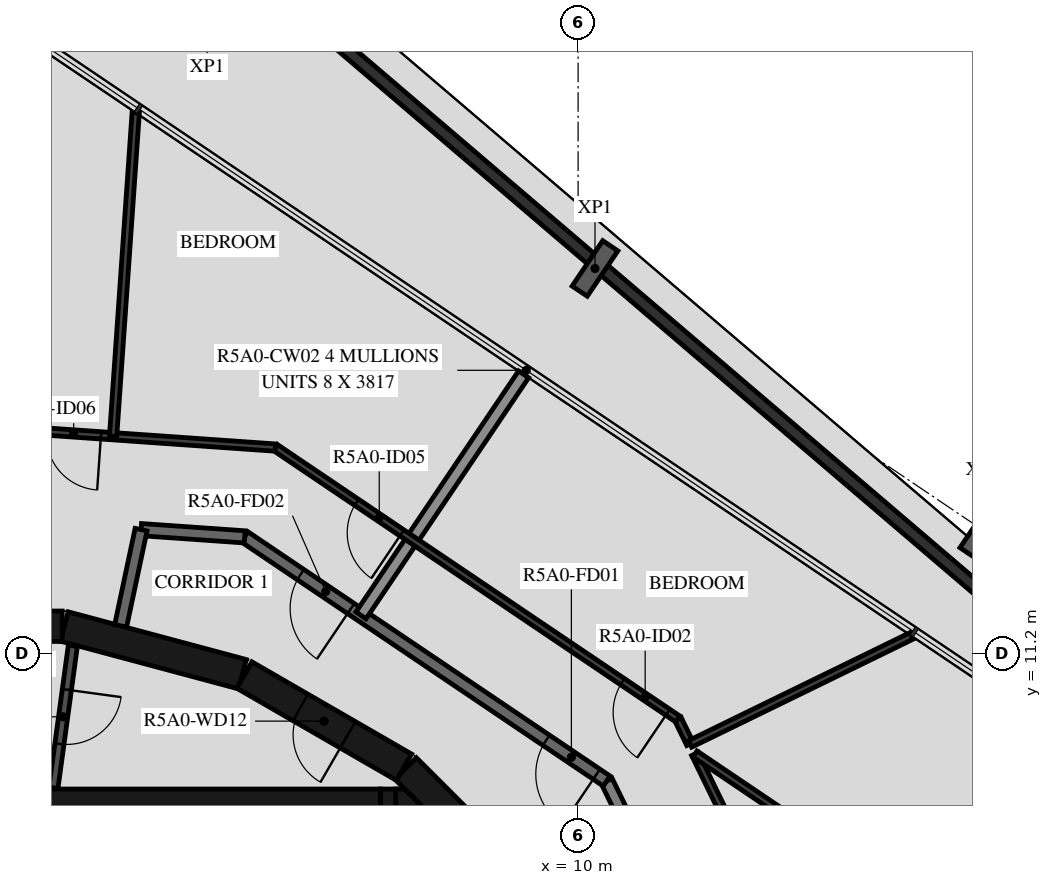
"""IFC4 building model, lengths in metres.
Left out: names, types, materials, properties, quantities, classifications, styles, units other than length and angle.
Written with IfcOpenShell. Run it as: python <this file> out.ifc"""

import sys

from ifc_helpers import new_model, si_unit, direction, frame, frame_2d, origin, origin_2d, place, context, subcontext, project, spatial, polyline, rectangle, i_section, outline, extrude, element, fill, save


model = new_model("IFC4")
c1 = context("Model", 3, precision=1e-05, world=origin(), true_north=direction((0.0, 1.0)))
c2 = subcontext(c1, "Body", "Model", "MODEL_VIEW")
j1 = project(units=[si_unit("LENGTHUNIT", "METRE"), si_unit("PLANEANGLEUNIT", "RADIAN")], contexts=[c1])
p1 = place(None, origin())
s1 = spatial("IfcSite", under=j1, at=p1, CompositionType="ELEMENT")
p2 = place(p1, origin())
s2 = spatial("IfcBuilding", under=s1, at=p2, CompositionType="ELEMENT")
p3 = place(p2, frame((0.0, 0.0, 188.4)))
s3 = spatial("IfcBuildingStorey", under=s2, at=p3, CompositionType="ELEMENT", Elevation=188.4)
for number, where, z_axis, x_axis in (
    (1, (16.656, 13.228, -0.45), (0.0, 0.0, 1.0), (0.829, -0.559, 0.0)),
    (2, (10.278, 17.531, -0.45), (0.0, 0.0, 1.0), (0.829, -0.559, 0.0)),
):
    element("IfcColumn", number, at=place(p3, frame(where, z_axis=z_axis, x_axis=x_axis)), inside=s3, PredefinedType="COLUMN", context=c2, shape_type="SweptSolid", body=[
        extrude(i_section(OverallWidth=0.3, OverallDepth=0.9, WebThickness=0.019, FlangeThickness=0.035, FilletRadius=0.03, at=origin_2d()), origin(), (0.0, 0.0, 1.0), 3.57),
    ])
p4 = place(p3, frame((-0.808, 27.101, 0.03), z_axis=(0.0, 0.0, 1.0), x_axis=(0.76040780846, -0.649445890613, 0.0)))
e3 = element("IfcWall", 3, at=p4, inside=s3, PredefinedType="PARAPET", context=c2, shape_type="SweptSolid", body=[
    extrude(rectangle(XDim=36.429, YDim=0.2, at=frame_2d((18.214, 0.0))), origin(), (0.0, 0.0, 1.0), 1.5),
])
p5 = place(p3, frame((9.308, 7.164, 0.0), z_axis=(0.0, 0.0, 1.0), x_axis=(-0.707106781187, 0.707106781187, 0.0)))
e4 = element("IfcWall", 4, at=p5, inside=s3, PredefinedType="SHEAR", context=c2, shape_type="SweptSolid", body=[
    extrude(rectangle(XDim=3.032, YDim=0.5, at=frame_2d((1.516, 0.0))), origin(), (0.0, 0.0, 1.0), 3.12),
])
p6 = place(p5, frame((0.416, 0.0, 0.0)))
e5 = element("IfcOpeningElement", 5, at=p6, cuts=e4, PredefinedType="OPENING", context=c2, shape_type="SweptSolid", body=[
    extrude(rectangle(XDim=1.2, YDim=2.1, at=frame_2d((0.6, 1.05))), frame((0.0, 0.26, 0.0), z_axis=(0.0, -1.0, 0.0), x_axis=(1.0, 0.0, 0.0)), (0.0, 0.0, 1.0), 0.52),
])
p7 = place(p3, frame((7.137, 9.329, 0.0), z_axis=(0.0, 0.0, 1.0), x_axis=(-0.865975092491, 0.500087131594, 0.0)))
e6 = element("IfcWall", 6, at=p7, inside=s3, PredefinedType="SHEAR", context=c2, shape_type="SweptSolid", body=[
    extrude(rectangle(XDim=3.033, YDim=0.5, at=frame_2d((1.516, 0.0))), origin(), (0.0, 0.0, 1.0), 3.12),
])
p8 = place(p7, frame((1.066, 0.0, 0.0)))
e7 = element("IfcOpeningElement", 7, at=p8, cuts=e6, PredefinedType="OPENING", context=c2, shape_type="SweptSolid", body=[
    extrude(rectangle(XDim=0.9, YDim=2.1, at=frame_2d((0.45, 1.05))), frame((0.0, 0.26, 0.0), z_axis=(0.0, -1.0, 0.0), x_axis=(1.0, 0.0, 0.0)), (0.0, 0.0, 1.0), 0.52),
])
for number, where, z_axis, x_axis in (
    (8, (4.479, 10.858, 0.0), (0.0, 0.0, 1.0), (-0.966, 0.259, 0.0)),
    (9, (1.516, 11.647, 0.0), (0.0, 0.0, 1.0), (-1.0, 0.0, 0.0)),
):
    element("IfcWall", number, at=place(p3, frame(where, z_axis=z_axis, x_axis=x_axis)), inside=s3, PredefinedType="SHEAR", context=c2, shape_type="SweptSolid", body=[
        extrude(rectangle(XDim=3.033, YDim=0.5, at=frame_2d((1.516, 0.0))), origin(), (0.0, 0.0, 1.0), 3.12),
    ])
p9 = place(p3, frame((0.0, 8.82, 0.0), z_axis=(0.0, 0.0, 1.0), x_axis=(1.0, 0.0, 0.0)))
e10 = element("IfcWall", 10, at=p9, inside=s3, PredefinedType="SHEAR", context=c2, shape_type="SweptSolid", body=[
    extrude(rectangle(XDim=6.75, YDim=0.3, at=frame_2d((3.375, 0.0))), origin(), (0.0, 0.0, 1.0), 3.12),
])
p10 = place(p3, frame((6.875, 5.05, 0.0), z_axis=(0.0, 0.0, 1.0), x_axis=(0.0, 1.0, 0.0)))
e11 = element("IfcWall", 11, at=p10, inside=s3, PredefinedType="SHEAR", context=c2, shape_type="SweptSolid", body=[
    extrude(rectangle(XDim=3.92, YDim=0.25, at=frame_2d((1.96, 0.0))), origin(), (0.0, 0.0, 1.0), 3.12),
])
p11 = place(p10, frame((1.11, 0.0, 0.0)))
e12 = element("IfcOpeningElement", 12, at=p11, cuts=e11, PredefinedType="OPENING", context=c2, shape_type="SweptSolid", body=[
    extrude(rectangle(XDim=1.2, YDim=2.1, at=frame_2d((0.6, 1.05))), frame((0.0, 0.135, 0.0), z_axis=(0.0, -1.0, 0.0), x_axis=(1.0, 0.0, 0.0)), (0.0, 0.0, 1.0), 0.27),
])
p12 = place(p3, origin())
e13 = element("IfcWall", 13, at=p12, inside=s3, PredefinedType="SHEAR", context=c2, shape_type="SweptSolid", body=[
    extrude(outline(polyline([(7.448, 8.67), (7.0, 8.67), (7.0, 8.97), (7.148, 8.97), (7.448, 8.67)])), origin(), (0.0, 0.0, 1.0), 3.12),
])
p13 = place(p3, frame((1.691, 11.326, 0.0), z_axis=(0.0, 0.0, 1.0), x_axis=(-0.135344253201, -0.990798633994, 0.0)))
e14 = element("IfcWall", 14, at=p13, inside=s3, PredefinedType="PARTITIONING", context=c2, shape_type="SweptSolid", body=[
    extrude(rectangle(XDim=2.358, YDim=0.15, at=frame_2d((1.179, 0.0))), origin(), (0.0, 0.0, 1.0), 3.12),
])
p14 = place(p13, frame((0.729, 0.0, 0.0)))
e15 = element("IfcOpeningElement", 15, at=p14, cuts=e14, PredefinedType="OPENING", context=c2, shape_type="SweptSolid", body=[
    extrude(rectangle(XDim=0.9, YDim=2.1, at=frame_2d((0.45, 1.05))), frame((0.0, 0.085, 0.0), z_axis=(0.0, -1.0, 0.0), x_axis=(1.0, 0.0, 0.0)), (0.0, 0.0, 1.0), 0.17),
])
p15 = place(p3, frame((13.618, 2.647, 0.0), z_axis=(0.0, 0.0, 1.0), x_axis=(-0.438366026218, 0.898796543751, 0.0)))
e16 = element("IfcWall", 16, at=p15, inside=s3, PredefinedType="STANDARD", context=c2, shape_type="SweptSolid", body=[
    extrude(rectangle(XDim=7.181, YDim=0.2, at=frame_2d((3.591, 0.0))), origin(), (0.0, 0.0, 1.0), 3.12),
])
p16 = place(p3, frame((10.47, 9.101, 0.0), z_axis=(0.0, 0.0, 1.0), x_axis=(-0.829035841718, 0.559195469534, 0.0)))
e17 = element("IfcWall", 17, at=p16, inside=s3, PredefinedType="STANDARD", context=c2, shape_type="SweptSolid", body=[
    extrude(rectangle(XDim=7.181, YDim=0.2, at=frame_2d((3.591, 0.0))), origin(), (0.0, 0.0, 1.0), 3.12),
])
p17 = place(p16, frame((0.2, 0.0, 0.0)))
e18 = element("IfcOpeningElement", 18, at=p17, cuts=e17, PredefinedType="OPENING", context=c2, shape_type="SweptSolid", body=[
    extrude(rectangle(XDim=1.0, YDim=2.1, at=frame_2d((0.5, 1.05))), frame((0.0, 0.11, 0.0), z_axis=(0.0, -1.0, 0.0), x_axis=(1.0, 0.0, 0.0)), (0.0, 0.0, 1.0), 0.22),
])
p18 = place(p16, frame((5.073, 0.0, 0.0)))
e19 = element("IfcOpeningElement", 19, at=p18, cuts=e17, PredefinedType="OPENING", context=c2, shape_type="SweptSolid", body=[
    extrude(rectangle(XDim=1.0, YDim=2.1, at=frame_2d((0.5, 1.05))), frame((0.0, 0.11, 0.0), z_axis=(0.0, -1.0, 0.0), x_axis=(1.0, 0.0, 0.0)), (0.0, 0.0, 1.0), 0.22),
])
p19 = place(p3, frame((4.517, 13.117, 0.0), z_axis=(0.0, 0.0, 1.0), x_axis=(-0.997562153664, 0.069783591025, 0.0)))
e20 = element("IfcWall", 20, at=p19, inside=s3, PredefinedType="STANDARD", context=c2, shape_type="SweptSolid", body=[
    extrude(rectangle(XDim=1.707, YDim=0.2, at=frame_2d((0.854, 0.0))), origin(), (0.0, 0.0, 1.0), 3.12),
])
p20 = place(p3, frame((2.813, 13.236, 0.0), z_axis=(0.0, 0.0, 1.0), x_axis=(-0.207911086063, -0.978147729278, 0.0)))
e21 = element("IfcWall", 21, at=p20, inside=s3, PredefinedType="STANDARD", context=c2, shape_type="SweptSolid", body=[
    extrude(rectangle(XDim=1.618, YDim=0.2, at=frame_2d((0.809, 0.0))), origin(), (0.0, 0.0, 1.0), 3.12),
])
p21 = place(p3, frame((9.104, 15.79, 0.0), z_axis=(0.0, 0.0, 1.0), x_axis=(-0.559193912135, -0.829036892201, 0.0)))
e22 = element("IfcWall", 22, at=p21, inside=s3, PredefinedType="STANDARD", context=c2, shape_type="SweptSolid", body=[
    extrude(rectangle(XDim=4.781, YDim=0.2, at=frame_2d((2.39, 0.0))), origin(), (0.0, 0.0, 1.0), 2.73),
])
p22 = place(p3, frame((13.953, 5.382, 0.0), z_axis=(0.0, 0.0, 1.0), x_axis=(-0.438382107355, 0.898788700391, 0.0)))
e23 = element("IfcWall", 23, at=p22, inside=s3, PredefinedType="PARTITIONING", context=c2, shape_type="SweptSolid", body=[
    extrude(rectangle(XDim=4.634, YDim=0.12, at=frame_2d((2.317, 0.0))), origin(), (0.0, 0.0, 1.0), 3.12),
])
p23 = place(p3, frame((11.841, 9.712, 0.0), z_axis=(0.0, 0.0, 1.0), x_axis=(-0.438381293215, 0.898789097486, 0.0)))
e24 = element("IfcWall", 24, at=p23, inside=s3, PredefinedType="PARTITIONING", context=c2, shape_type="SweptSolid", body=[
    extrude(rectangle(XDim=0.454, YDim=0.12, at=frame_2d((0.227, 0.0))), origin(), (0.0, 0.0, 1.0), 3.12),
])
p24 = place(p3, frame((11.642, 10.12, 0.0), z_axis=(0.0, 0.0, 1.0), x_axis=(-0.829032241779, 0.55920080659, 0.0)))
e25 = element("IfcWall", 25, at=p24, inside=s3, PredefinedType="PARTITIONING", context=c2, shape_type="SweptSolid", body=[
    extrude(rectangle(XDim=7.985, YDim=0.12, at=frame_2d((3.992, 0.0))), origin(), (0.0, 0.0, 1.0), 3.12),
])
p25 = place(p24, frame((0.2, 0.0, 0.0)))
e26 = element("IfcOpeningElement", 26, at=p25, cuts=e25, PredefinedType="OPENING", context=c2, shape_type="SweptSolid", body=[
    extrude(rectangle(XDim=0.9, YDim=2.1, at=frame_2d((0.45, 1.05))), frame((0.0, 0.07, 0.0), z_axis=(0.0, -1.0, 0.0), x_axis=(1.0, 0.0, 0.0)), (0.0, 0.0, 1.0), 0.14),
])
p26 = place(p24, frame((5.475, 0.0, 0.0)))
e27 = element("IfcOpeningElement", 27, at=p26, cuts=e25, PredefinedType="OPENING", context=c2, shape_type="SweptSolid", body=[
    extrude(rectangle(XDim=0.9, YDim=2.1, at=frame_2d((0.45, 1.05))), frame((0.0, 0.07, 0.0), z_axis=(0.0, -1.0, 0.0), x_axis=(1.0, 0.0, 0.0)), (0.0, 0.0, 1.0), 0.14),
])
p27 = place(p3, frame((22.598, 2.345, 0.0), z_axis=(0.0, 0.0, 1.0), x_axis=(-0.829034113947, 0.559198031034, 0.0)))
e28 = element("IfcWall", 28, at=p27, inside=s3, PredefinedType="PARTITIONING", context=c2, shape_type="SweptSolid", body=[
    extrude(rectangle(XDim=12.879, YDim=0.12, at=frame_2d((6.439, 0.0))), origin(), (0.0, 0.0, 1.0), 3.12),
])
p28 = place(p27, frame((0.2, 0.0, 0.0)))
e29 = element("IfcOpeningElement", 29, at=p28, cuts=e28, PredefinedType="OPENING", context=c2, shape_type="SweptSolid", body=[
    extrude(rectangle(XDim=0.9, YDim=2.1, at=frame_2d((0.45, 1.05))), frame((0.0, 0.07, 0.0), z_axis=(0.0, -1.0, 0.0), x_axis=(1.0, 0.0, 0.0)), (0.0, 0.0, 1.0), 0.14),
])
p29 = place(p3, frame((15.482, 11.487, 0.0), z_axis=(0.0, 0.0, 1.0), x_axis=(-0.898807251285, -0.438344071521, 0.0)))
e30 = element("IfcWall", 30, at=p29, inside=s3, PredefinedType="PARTITIONING", context=c2, shape_type="SweptSolid", body=[
    extrude(rectangle(XDim=4.051, YDim=0.12, at=frame_2d((2.025, 0.0))), origin(), (0.0, 0.0, 1.0), 3.12),
])
p30 = place(p3, frame((5.022, 14.585, 0.0), z_axis=(0.0, 0.0, 1.0), x_axis=(-0.997565118395, 0.069741197017, 0.0)))
e31 = element("IfcWall", 31, at=p30, inside=s3, PredefinedType="PARTITIONING", context=c2, shape_type="SweptSolid", body=[
    extrude(rectangle(XDim=7.985, YDim=0.12, at=frame_2d((3.993, 0.0))), origin(), (0.0, 0.0, 1.0), 3.12),
])
p31 = place(p30, frame((2.875, 0.0, 0.0)))
e32 = element("IfcOpeningElement", 32, at=p31, cuts=e31, PredefinedType="OPENING", context=c2, shape_type="SweptSolid", body=[
    extrude(rectangle(XDim=0.9, YDim=2.1, at=frame_2d((0.45, 1.05))), frame((0.0, 0.07, 0.0), z_axis=(0.0, -1.0, 0.0), x_axis=(1.0, 0.0, 0.0)), (0.0, 0.0, 1.0), 0.14),
])
p32 = place(p30, frame((6.938, 0.0, 0.0)))
e33 = element("IfcOpeningElement", 33, at=p32, cuts=e31, PredefinedType="OPENING", context=c2, shape_type="SweptSolid", body=[
    extrude(rectangle(XDim=0.8, YDim=2.1, at=frame_2d((0.4, 1.05))), frame((0.0, 0.07, 0.0), z_axis=(0.0, -1.0, 0.0), x_axis=(1.0, 0.0, 0.0)), (0.0, 0.0, 1.0), 0.14),
])
p33 = place(p3, frame((2.725, 20.092, 0.0), z_axis=(0.0, 0.0, 1.0), x_axis=(-0.069766716578, -0.997563333958, 0.0)))
e34 = element("IfcWall", 34, at=p33, inside=s3, PredefinedType="PARTITIONING", context=c2, shape_type="SweptSolid", body=[
    extrude(rectangle(XDim=5.333, YDim=0.12, at=frame_2d((2.667, 0.0))), origin(), (0.0, 0.0, 1.0), 3.12),
])
p34 = place(p14, origin())
e35 = element("IfcDoor", 35, at=p34, inside=s3, OperationType="SINGLE_SWING_RIGHT", PredefinedType="DOOR", context=c2, shape_type="SweptSolid", body=[
    extrude(rectangle(XDim=0.9, YDim=2.1, at=frame_2d((0.45, 1.05))), frame((0.0, 0.025, 0.0), z_axis=(0.0, -1.0, 0.0), x_axis=(1.0, 0.0, 0.0)), (0.0, 0.0, 1.0), 0.05),
])
fill(e15, e35)
p35 = place(p8, origin())
e36 = element("IfcDoor", 36, at=p35, inside=s3, OperationType="SINGLE_SWING_RIGHT", PredefinedType="DOOR", context=c2, shape_type="SweptSolid", body=[
    extrude(rectangle(XDim=0.9, YDim=2.1, at=frame_2d((0.45, 1.05))), frame((0.0, 0.025, 0.0), z_axis=(0.0, -1.0, 0.0), x_axis=(1.0, 0.0, 0.0)), (0.0, 0.0, 1.0), 0.05),
])
fill(e7, e36)
p36 = place(p17, origin())
e37 = element("IfcDoor", 37, at=p36, inside=s3, OperationType="SINGLE_SWING_LEFT", PredefinedType="DOOR", context=c2, shape_type="SweptSolid", body=[
    extrude(rectangle(XDim=1.0, YDim=2.1, at=frame_2d((0.5, 1.05))), frame((0.0, 0.025, 0.0), z_axis=(0.0, -1.0, 0.0), x_axis=(1.0, 0.0, 0.0)), (0.0, 0.0, 1.0), 0.05),
])
fill(e18, e37)
p37 = place(p25, origin())
e38 = element("IfcDoor", 38, at=p37, inside=s3, OperationType="SINGLE_SWING_LEFT", PredefinedType="DOOR", context=c2, shape_type="SweptSolid", body=[
    extrude(rectangle(XDim=0.9, YDim=2.1, at=frame_2d((0.45, 1.05))), frame((0.0, 0.025, 0.0), z_axis=(0.0, -1.0, 0.0), x_axis=(1.0, 0.0, 0.0)), (0.0, 0.0, 1.0), 0.05),
])
fill(e26, e38)
p38 = place(p18, origin())
e39 = element("IfcDoor", 39, at=p38, inside=s3, OperationType="SINGLE_SWING_RIGHT", PredefinedType="DOOR", context=c2, shape_type="SweptSolid", body=[
    extrude(rectangle(XDim=1.0, YDim=2.1, at=frame_2d((0.5, 1.05))), frame((0.0, 0.025, 0.0), z_axis=(0.0, -1.0, 0.0), x_axis=(1.0, 0.0, 0.0)), (0.0, 0.0, 1.0), 0.05),
])
fill(e19, e39)
p39 = place(p26, origin())
e40 = element("IfcDoor", 40, at=p39, inside=s3, OperationType="SINGLE_SWING_RIGHT", PredefinedType="DOOR", context=c2, shape_type="SweptSolid", body=[
    extrude(rectangle(XDim=0.9, YDim=2.1, at=frame_2d((0.45, 1.05))), frame((0.0, 0.025, 0.0), z_axis=(0.0, -1.0, 0.0), x_axis=(1.0, 0.0, 0.0)), (0.0, 0.0, 1.0), 0.05),
])
fill(e27, e40)
p40 = place(p31, origin())
e41 = element("IfcDoor", 41, at=p40, inside=s3, OperationType="SINGLE_SWING_RIGHT", PredefinedType="DOOR", context=c2, shape_type="SweptSolid", body=[
    extrude(rectangle(XDim=0.9, YDim=2.1, at=frame_2d((0.45, 1.05))), frame((0.0, 0.025, 0.0), z_axis=(0.0, -1.0, 0.0), x_axis=(1.0, 0.0, 0.0)), (0.0, 0.0, 1.0), 0.05),
])
fill(e32, e41)
save(model, sys.argv[1])
